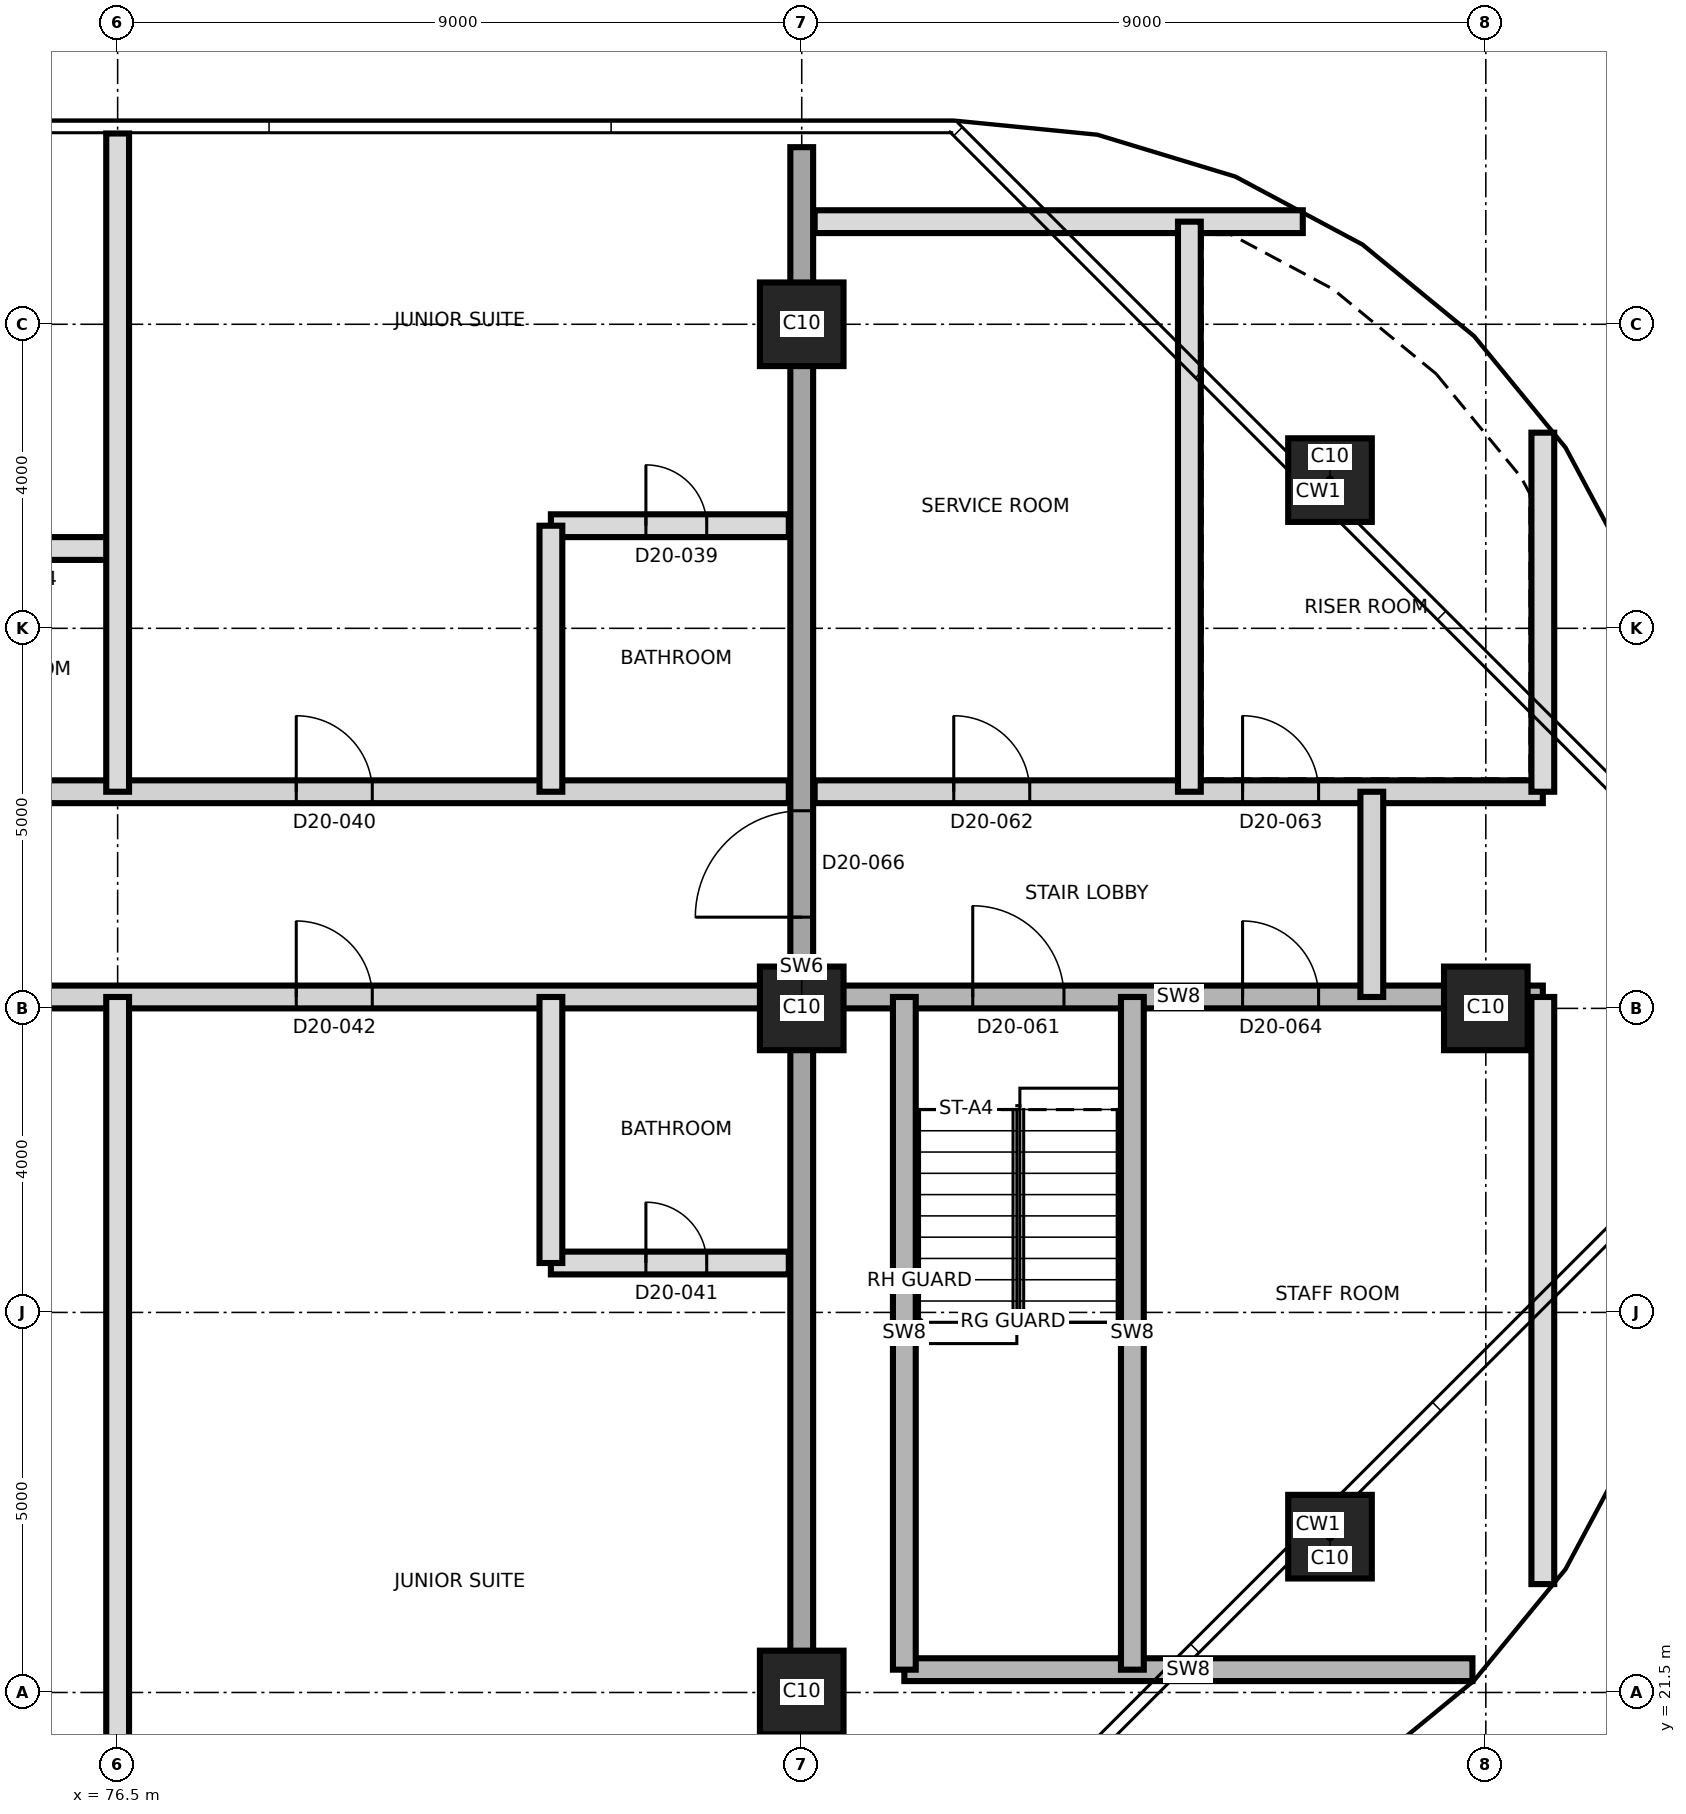
"""IFC4 building model, lengths in metres.
Left out: names, types, materials, properties, quantities, classifications, styles, units other than length and angle.
Written with IfcOpenShell. Run it as: python <this file> out.ifc"""

import sys

from ifc_helpers import new_model, si_unit, direction, frame, frame_2d, origin, origin_2d, place, context, subcontext, project, spatial, rectangle, extrude, element, fill, save


model = new_model("IFC4")
c1 = context("Model", 3, precision=1e-05, world=origin(), true_north=direction((0.0, 1.0)))
c2 = subcontext(c1, "Body", "Model", "MODEL_VIEW")
j1 = project(units=[si_unit("LENGTHUNIT", "METRE"), si_unit("PLANEANGLEUNIT", "RADIAN")], contexts=[c1])
p1 = place(None, origin())
s1 = spatial("IfcSite", under=j1, at=p1, CompositionType="ELEMENT")
p2 = place(p1, origin())
s2 = spatial("IfcBuilding", under=s1, at=p2, CompositionType="ELEMENT")
p3 = place(p2, frame((0.0, 0.0, 186.6)))
s3 = spatial("IfcBuildingStorey", under=s2, at=p3, CompositionType="ELEMENT", Elevation=186.6)
for number, where, z_axis, x_axis in (
    (1, (85.5, 21.5, 0.0), (0.0, 0.0, 1.0), (1.0, 0.0, 0.0)),
    (2, (92.45, 23.55, 0.0), (0.0, 0.0, 1.0), (1.0, 0.0, 0.0)),
    (3, (85.5, 30.5, 0.0), (0.0, 0.0, 1.0), (1.0, 0.0, 0.0)),
    (4, (94.5, 30.5, 0.0), (0.0, 0.0, 1.0), (1.0, 0.0, 0.0)),
    (5, (92.45, 37.45, 0.0), (0.0, 0.0, 1.0), (1.0, 0.0, 0.0)),
    (6, (85.5, 39.5, 0.0), (0.0, 0.0, 1.0), (1.0, 0.0, 0.0)),
):
    element("IfcColumn", number, at=place(p3, frame(where, z_axis=z_axis, x_axis=x_axis)), inside=s3, PredefinedType="COLUMN", context=c2, shape_type="SweptSolid", body=[
        extrude(rectangle(XDim=1.1, YDim=1.1, at=origin_2d()), origin(), (0.0, 0.0, 1.0), 3.7),
    ])
p4 = place(p3, frame((85.5, 19.17, 0.0), z_axis=(0.0, 0.0, 1.0), x_axis=(0.0, 1.0, 0.0)))
e7 = element("IfcWall", 7, at=p4, inside=s3, PredefinedType="SHEAR", context=c2, shape_type="SweptSolid", body=[
    extrude(rectangle(XDim=22.66, YDim=0.3, at=frame_2d((11.33, 0.0))), origin(), (0.0, 0.0, 1.0), 3.7),
])
p5 = place(p4, frame((12.53, 0.0, 0.0)))
e8 = element("IfcOpeningElement", 8, at=p5, cuts=e7, PredefinedType="OPENING", context=c2, shape_type="SweptSolid", body=[
    extrude(rectangle(XDim=1.4, YDim=2.1, at=frame_2d((0.7, 1.05))), frame((0.0, 0.16, 0.0), z_axis=(0.0, -1.0, 0.0), x_axis=(1.0, 0.0, 0.0)), (0.0, 0.0, 1.0), 0.32),
])
p6 = place(p3, frame((86.85, 21.8, 0.0), z_axis=(0.0, 0.0, 1.0), x_axis=(1.0, 0.0, 0.0)))
e9 = element("IfcWall", 9, at=p6, inside=s3, PredefinedType="SHEAR", context=c2, shape_type="SweptSolid", body=[
    extrude(rectangle(XDim=7.474, YDim=0.3, at=frame_2d((3.737, 0.0))), origin(), (0.0, 0.0, 1.0), 3.4),
])
p7 = place(p3, frame((82.2, 27.15, 0.0), z_axis=(0.0, 0.0, 1.0), x_axis=(1.0, 0.0, 0.0)))
e10 = element("IfcWall", 10, at=p7, inside=s3, PredefinedType="PARTITIONING", context=c2, shape_type="SweptSolid", body=[
    extrude(rectangle(XDim=3.13, YDim=0.3, at=frame_2d((1.565, 0.0))), origin(), (0.0, 0.0, 1.0), 3.4),
])
p8 = place(p7, frame((1.25, 0.0, 0.0)))
e11 = element("IfcOpeningElement", 11, at=p8, cuts=e10, PredefinedType="OPENING", context=c2, shape_type="SweptSolid", body=[
    extrude(rectangle(XDim=0.8, YDim=2.1, at=frame_2d((0.4, 1.05))), frame((0.0, 0.16, 0.0), z_axis=(0.0, -1.0, 0.0), x_axis=(1.0, 0.0, 0.0)), (0.0, 0.0, 1.0), 0.32),
])
p9 = place(p3, frame((58.65, 30.65, 0.0), z_axis=(0.0, 0.0, 1.0), x_axis=(1.0, 0.0, 0.0)))
e12 = element("IfcWall", 12, at=p9, inside=s3, PredefinedType="PARTITIONING", context=c2, shape_type="SweptSolid", body=[
    extrude(rectangle(XDim=26.68, YDim=0.3, at=frame_2d((13.34, 0.0))), origin(), (0.0, 0.0, 1.0), 3.4),
])
p10 = place(p9, frame((2.9, 0.0, 0.0)))
e13 = element("IfcOpeningElement", 13, at=p10, cuts=e12, PredefinedType="OPENING", context=c2, shape_type="SweptSolid", body=[
    extrude(rectangle(XDim=1.0, YDim=2.1, at=frame_2d((0.5, 1.05))), frame((0.0, 0.16, 0.0), z_axis=(0.0, -1.0, 0.0), x_axis=(1.0, 0.0, 0.0)), (0.0, 0.0, 1.0), 0.32),
])
p11 = place(p9, frame((5.85, 0.0, 0.0)))
e14 = element("IfcOpeningElement", 14, at=p11, cuts=e12, PredefinedType="OPENING", context=c2, shape_type="SweptSolid", body=[
    extrude(rectangle(XDim=1.4, YDim=2.1, at=frame_2d((0.7, 1.05))), frame((0.0, 0.16, 0.0), z_axis=(0.0, -1.0, 0.0), x_axis=(1.0, 0.0, 0.0)), (0.0, 0.0, 1.0), 0.32),
])
p12 = place(p9, frame((10.0, 0.0, 0.0)))
e15 = element("IfcOpeningElement", 15, at=p12, cuts=e12, PredefinedType="OPENING", context=c2, shape_type="SweptSolid", body=[
    extrude(rectangle(XDim=1.0, YDim=2.1, at=frame_2d((0.5, 1.05))), frame((0.0, 0.16, 0.0), z_axis=(0.0, -1.0, 0.0), x_axis=(1.0, 0.0, 0.0)), (0.0, 0.0, 1.0), 0.32),
])
p13 = place(p9, frame((15.85, 0.0, 0.0)))
e16 = element("IfcOpeningElement", 16, at=p13, cuts=e12, PredefinedType="OPENING", context=c2, shape_type="SweptSolid", body=[
    extrude(rectangle(XDim=1.0, YDim=2.1, at=frame_2d((0.5, 1.05))), frame((0.0, 0.16, 0.0), z_axis=(0.0, -1.0, 0.0), x_axis=(1.0, 0.0, 0.0)), (0.0, 0.0, 1.0), 0.32),
])
p14 = place(p9, frame((20.2, 0.0, 0.0)))
e17 = element("IfcOpeningElement", 17, at=p14, cuts=e12, PredefinedType="OPENING", context=c2, shape_type="SweptSolid", body=[
    extrude(rectangle(XDim=1.0, YDim=2.1, at=frame_2d((0.5, 1.05))), frame((0.0, 0.16, 0.0), z_axis=(0.0, -1.0, 0.0), x_axis=(1.0, 0.0, 0.0)), (0.0, 0.0, 1.0), 0.32),
])
p15 = place(p3, frame((85.67, 30.65, 0.0), z_axis=(0.0, 0.0, 1.0), x_axis=(1.0, 0.0, 0.0)))
e18 = element("IfcWall", 18, at=p15, inside=s3, PredefinedType="SHEAR", context=c2, shape_type="SweptSolid", body=[
    extrude(rectangle(XDim=9.58, YDim=0.3, at=frame_2d((4.79, 0.0))), origin(), (0.0, 0.0, 1.0), 3.4),
])
p16 = place(p15, frame((2.08, 0.0, 0.0)))
e19 = element("IfcOpeningElement", 19, at=p16, cuts=e18, PredefinedType="OPENING", context=c2, shape_type="SweptSolid", body=[
    extrude(rectangle(XDim=1.2, YDim=2.1, at=frame_2d((0.6, 1.05))), frame((0.0, 0.16, 0.0), z_axis=(0.0, -1.0, 0.0), x_axis=(1.0, 0.0, 0.0)), (0.0, 0.0, 1.0), 0.32),
])
p17 = place(p15, frame((5.63, 0.0, 0.0)))
e20 = element("IfcOpeningElement", 20, at=p17, cuts=e18, PredefinedType="OPENING", context=c2, shape_type="SweptSolid", body=[
    extrude(rectangle(XDim=1.0, YDim=2.1, at=frame_2d((0.5, 1.05))), frame((0.0, 0.16, 0.0), z_axis=(0.0, -1.0, 0.0), x_axis=(1.0, 0.0, 0.0)), (0.0, 0.0, 1.0), 0.32),
])
p18 = place(p3, frame((58.65, 33.35, 0.0), z_axis=(0.0, 0.0, 1.0), x_axis=(1.0, 0.0, 0.0)))
e21 = element("IfcWall", 21, at=p18, inside=s3, PredefinedType="PARTITIONING", context=c2, shape_type="SweptSolid", body=[
    extrude(rectangle(XDim=26.68, YDim=0.3, at=frame_2d((13.34, 0.0))), origin(), (0.0, 0.0, 1.0), 3.4),
])
p19 = place(p18, frame((3.265, 0.0, 0.0)))
e22 = element("IfcOpeningElement", 22, at=p19, cuts=e21, PredefinedType="OPENING", context=c2, shape_type="SweptSolid", body=[
    extrude(rectangle(XDim=1.0, YDim=2.1, at=frame_2d((0.5, 1.05))), frame((0.0, 0.16, 0.0), z_axis=(0.0, -1.0, 0.0), x_axis=(1.0, 0.0, 0.0)), (0.0, 0.0, 1.0), 0.32),
])
p20 = place(p18, frame((6.215, 0.0, 0.0)))
e23 = element("IfcOpeningElement", 23, at=p20, cuts=e21, PredefinedType="OPENING", context=c2, shape_type="SweptSolid", body=[
    extrude(rectangle(XDim=1.4, YDim=2.1, at=frame_2d((0.7, 1.05))), frame((0.0, 0.16, 0.0), z_axis=(0.0, -1.0, 0.0), x_axis=(1.0, 0.0, 0.0)), (0.0, 0.0, 1.0), 0.32),
])
p21 = place(p18, frame((9.985, 0.0, 0.0)))
e24 = element("IfcOpeningElement", 24, at=p21, cuts=e21, PredefinedType="OPENING", context=c2, shape_type="SweptSolid", body=[
    extrude(rectangle(XDim=1.2, YDim=2.1, at=frame_2d((0.6, 1.05))), frame((0.0, 0.16, 0.0), z_axis=(0.0, -1.0, 0.0), x_axis=(1.0, 0.0, 0.0)), (0.0, 0.0, 1.0), 0.32),
])
p22 = place(p18, frame((13.235, 0.0, 0.0)))
e25 = element("IfcOpeningElement", 25, at=p22, cuts=e21, PredefinedType="OPENING", context=c2, shape_type="SweptSolid", body=[
    extrude(rectangle(XDim=1.0, YDim=2.1, at=frame_2d((0.5, 1.05))), frame((0.0, 0.16, 0.0), z_axis=(0.0, -1.0, 0.0), x_axis=(1.0, 0.0, 0.0)), (0.0, 0.0, 1.0), 0.32),
])
p23 = place(p18, frame((20.2, 0.0, 0.0)))
e26 = element("IfcOpeningElement", 26, at=p23, cuts=e21, PredefinedType="OPENING", context=c2, shape_type="SweptSolid", body=[
    extrude(rectangle(XDim=1.0, YDim=2.1, at=frame_2d((0.5, 1.05))), frame((0.0, 0.16, 0.0), z_axis=(0.0, -1.0, 0.0), x_axis=(1.0, 0.0, 0.0)), (0.0, 0.0, 1.0), 0.32),
])
p24 = place(p3, frame((85.67, 33.35, 0.0), z_axis=(0.0, 0.0, 1.0), x_axis=(1.0, 0.0, 0.0)))
e27 = element("IfcWall", 27, at=p24, inside=s3, PredefinedType="PARTITIONING", context=c2, shape_type="SweptSolid", body=[
    extrude(rectangle(XDim=9.58, YDim=0.3, at=frame_2d((4.79, 0.0))), origin(), (0.0, 0.0, 1.0), 3.4),
])
p25 = place(p24, frame((1.83, 0.0, 0.0)))
e28 = element("IfcOpeningElement", 28, at=p25, cuts=e27, PredefinedType="OPENING", context=c2, shape_type="SweptSolid", body=[
    extrude(rectangle(XDim=1.0, YDim=2.1, at=frame_2d((0.5, 1.05))), frame((0.0, 0.16, 0.0), z_axis=(0.0, -1.0, 0.0), x_axis=(1.0, 0.0, 0.0)), (0.0, 0.0, 1.0), 0.32),
])
p26 = place(p24, frame((5.63, 0.0, 0.0)))
e29 = element("IfcOpeningElement", 29, at=p26, cuts=e27, PredefinedType="OPENING", context=c2, shape_type="SweptSolid", body=[
    extrude(rectangle(XDim=1.0, YDim=2.1, at=frame_2d((0.5, 1.05))), frame((0.0, 0.16, 0.0), z_axis=(0.0, -1.0, 0.0), x_axis=(1.0, 0.0, 0.0)), (0.0, 0.0, 1.0), 0.32),
])
p27 = place(p3, frame((73.8, 36.55, 0.0), z_axis=(0.0, 0.0, 1.0), x_axis=(1.0, 0.0, 0.0)))
e30 = element("IfcWall", 30, at=p27, inside=s3, PredefinedType="PARTITIONING", context=c2, shape_type="SweptSolid", body=[
    extrude(rectangle(XDim=2.7, YDim=0.3, at=frame_2d((1.35, 0.0))), origin(), (0.0, 0.0, 1.0), 3.4),
])
p28 = place(p27, frame((0.95, 0.0, 0.0)))
e31 = element("IfcOpeningElement", 31, at=p28, cuts=e30, PredefinedType="OPENING", context=c2, shape_type="SweptSolid", body=[
    extrude(rectangle(XDim=0.8, YDim=2.1, at=frame_2d((0.4, 1.05))), frame((0.0, 0.16, 0.0), z_axis=(0.0, -1.0, 0.0), x_axis=(1.0, 0.0, 0.0)), (0.0, 0.0, 1.0), 0.32),
])
p29 = place(p3, frame((82.2, 36.85, 0.0), z_axis=(0.0, 0.0, 1.0), x_axis=(1.0, 0.0, 0.0)))
e32 = element("IfcWall", 32, at=p29, inside=s3, PredefinedType="PARTITIONING", context=c2, shape_type="SweptSolid", body=[
    extrude(rectangle(XDim=3.13, YDim=0.3, at=frame_2d((1.565, 0.0))), origin(), (0.0, 0.0, 1.0), 3.4),
])
p30 = place(p29, frame((1.25, 0.0, 0.0)))
e33 = element("IfcOpeningElement", 33, at=p30, cuts=e32, PredefinedType="OPENING", context=c2, shape_type="SweptSolid", body=[
    extrude(rectangle(XDim=0.8, YDim=2.1, at=frame_2d((0.4, 1.05))), frame((0.0, 0.16, 0.0), z_axis=(0.0, -1.0, 0.0), x_axis=(1.0, 0.0, 0.0)), (0.0, 0.0, 1.0), 0.32),
])
p31 = place(p3, frame((85.67, 40.85, 0.0), z_axis=(0.0, 0.0, 1.0), x_axis=(1.0, 0.0, 0.0)))
e34 = element("IfcWall", 34, at=p31, inside=s3, PredefinedType="PARTITIONING", context=c2, shape_type="SweptSolid", body=[
    extrude(rectangle(XDim=6.422, YDim=0.3, at=frame_2d((3.211, 0.0))), origin(), (0.0, 0.0, 1.0), 3.35),
])
p32 = place(p3, frame((76.5, 19.17, 0.0), z_axis=(0.0, 0.0, 1.0), x_axis=(0.0, 1.0, 0.0)))
e35 = element("IfcWall", 35, at=p32, inside=s3, PredefinedType="PARTITIONING", context=c2, shape_type="SweptSolid", body=[
    extrude(rectangle(XDim=11.48, YDim=0.3, at=frame_2d((5.74, 0.0))), origin(), (0.0, 0.0, 1.0), 3.35),
])
p33 = place(p3, frame((76.5, 33.35, 0.0), z_axis=(0.0, 0.0, 1.0), x_axis=(0.0, 1.0, 0.0)))
e36 = element("IfcWall", 36, at=p33, inside=s3, PredefinedType="PARTITIONING", context=c2, shape_type="SweptSolid", body=[
    extrude(rectangle(XDim=8.66, YDim=0.3, at=frame_2d((4.33, 0.0))), origin(), (0.0, 0.0, 1.0), 3.35),
])
for number, where, z_axis, x_axis in (
    (37, (82.2, 27.15, 0.0), (0.0, 0.0, 1.0), (0.0, 1.0, 0.0)),
    (38, (82.2, 33.35, 0.0), (0.0, 0.0, 1.0), (0.0, 1.0, 0.0)),
):
    element("IfcWall", number, at=place(p3, frame(where, z_axis=z_axis, x_axis=x_axis)), inside=s3, PredefinedType="PARTITIONING", context=c2, shape_type="SweptSolid", body=[
        extrude(rectangle(XDim=3.5, YDim=0.3, at=frame_2d((1.75, 0.0))), origin(), (0.0, 0.0, 1.0), 3.4),
    ])
for number, where, z_axis, x_axis in (
    (39, (86.85, 21.8, 0.0), (0.0, 0.0, 1.0), (0.0, 1.0, 0.0)),
    (40, (89.85, 21.8, 0.0), (0.0, 0.0, 1.0), (0.0, 1.0, 0.0)),
):
    element("IfcWall", number, at=place(p3, frame(where, z_axis=z_axis, x_axis=x_axis)), inside=s3, PredefinedType="SHEAR", context=c2, shape_type="SweptSolid", body=[
        extrude(rectangle(XDim=8.85, YDim=0.3, at=frame_2d((4.425, 0.0))), origin(), (0.0, 0.0, 1.0), 3.4),
    ])
p34 = place(p3, frame((90.6, 33.35, 0.0), z_axis=(0.0, 0.0, 1.0), x_axis=(0.0, 1.0, 0.0)))
e41 = element("IfcWall", 41, at=p34, inside=s3, PredefinedType="PARTITIONING", context=c2, shape_type="SweptSolid", body=[
    extrude(rectangle(XDim=7.5, YDim=0.3, at=frame_2d((3.75, 0.0))), origin(), (0.0, 0.0, 1.0), 3.35),
])
p35 = place(p3, frame((93.0, 30.65, 0.0), z_axis=(0.0, 0.0, 1.0), x_axis=(0.0, 1.0, 0.0)))
e42 = element("IfcWall", 42, at=p35, inside=s3, PredefinedType="PARTITIONING", context=c2, shape_type="SweptSolid", body=[
    extrude(rectangle(XDim=2.7, YDim=0.3, at=frame_2d((1.35, 0.0))), origin(), (0.0, 0.0, 1.0), 3.4),
])
p36 = place(p3, frame((95.25, 22.926, 0.0), z_axis=(0.0, 0.0, 1.0), x_axis=(0.0, 1.0, 0.0)))
e43 = element("IfcWall", 43, at=p36, inside=s3, PredefinedType="PARTITIONING", context=c2, shape_type="SweptSolid", body=[
    extrude(rectangle(XDim=7.724, YDim=0.3, at=frame_2d((3.862, 0.0))), origin(), (0.0, 0.0, 1.0), 3.35),
])
p37 = place(p3, frame((95.25, 33.35, 0.0), z_axis=(0.0, 0.0, 1.0), x_axis=(0.0, 1.0, 0.0)))
e44 = element("IfcWall", 44, at=p37, inside=s3, PredefinedType="PARTITIONING", context=c2, shape_type="SweptSolid", body=[
    extrude(rectangle(XDim=4.724, YDim=0.3, at=frame_2d((2.362, 0.0))), origin(), (0.0, 0.0, 1.0), 3.35),
])
p38 = place(p30, origin())
e45 = element("IfcDoor", 45, at=p38, inside=s3, OperationType="SINGLE_SWING_LEFT", PredefinedType="DOOR", context=c2, shape_type="SweptSolid", body=[
    extrude(rectangle(XDim=0.8, YDim=2.1, at=frame_2d((0.4, 1.05))), frame((0.0, 0.025, 0.0), z_axis=(0.0, -1.0, 0.0), x_axis=(1.0, 0.0, 0.0)), (0.0, 0.0, 1.0), 0.05),
])
fill(e33, e45)
p39 = place(p23, origin())
e46 = element("IfcDoor", 46, at=p39, inside=s3, OperationType="SINGLE_SWING_LEFT", PredefinedType="DOOR", context=c2, shape_type="SweptSolid", body=[
    extrude(rectangle(XDim=1.0, YDim=2.1, at=frame_2d((0.5, 1.05))), frame((0.0, 0.025, 0.0), z_axis=(0.0, -1.0, 0.0), x_axis=(1.0, 0.0, 0.0)), (0.0, 0.0, 1.0), 0.05),
])
fill(e26, e46)
p40 = place(p8, origin())
e47 = element("IfcDoor", 47, at=p40, inside=s3, OperationType="SINGLE_SWING_LEFT", PredefinedType="DOOR", context=c2, shape_type="SweptSolid", body=[
    extrude(rectangle(XDim=0.8, YDim=2.1, at=frame_2d((0.4, 1.05))), frame((0.0, 0.025, 0.0), z_axis=(0.0, -1.0, 0.0), x_axis=(1.0, 0.0, 0.0)), (0.0, 0.0, 1.0), 0.05),
])
fill(e11, e47)
p41 = place(p14, origin())
e48 = element("IfcDoor", 48, at=p41, inside=s3, OperationType="SINGLE_SWING_RIGHT", PredefinedType="DOOR", context=c2, shape_type="SweptSolid", body=[
    extrude(rectangle(XDim=1.0, YDim=2.1, at=frame_2d((0.5, 1.05))), frame((0.0, 0.025, 0.0), z_axis=(0.0, -1.0, 0.0), x_axis=(1.0, 0.0, 0.0)), (0.0, 0.0, 1.0), 0.05),
])
fill(e17, e48)
p42 = place(p16, origin())
e49 = element("IfcDoor", 49, at=p42, inside=s3, OperationType="SINGLE_SWING_LEFT", PredefinedType="DOOR", context=c2, shape_type="SweptSolid", body=[
    extrude(rectangle(XDim=1.2, YDim=2.1, at=frame_2d((0.6, 1.05))), frame((0.0, 0.025, 0.0), z_axis=(0.0, -1.0, 0.0), x_axis=(1.0, 0.0, 0.0)), (0.0, 0.0, 1.0), 0.05),
])
fill(e19, e49)
p43 = place(p25, origin())
e50 = element("IfcDoor", 50, at=p43, inside=s3, OperationType="SINGLE_SWING_LEFT", PredefinedType="DOOR", context=c2, shape_type="SweptSolid", body=[
    extrude(rectangle(XDim=1.0, YDim=2.1, at=frame_2d((0.5, 1.05))), frame((0.0, 0.025, 0.0), z_axis=(0.0, -1.0, 0.0), x_axis=(1.0, 0.0, 0.0)), (0.0, 0.0, 1.0), 0.05),
])
fill(e28, e50)
p44 = place(p26, origin())
e51 = element("IfcDoor", 51, at=p44, inside=s3, OperationType="SINGLE_SWING_RIGHT", PredefinedType="DOOR", context=c2, shape_type="SweptSolid", body=[
    extrude(rectangle(XDim=1.0, YDim=2.1, at=frame_2d((0.5, 1.05))), frame((0.0, 0.025, 0.0), z_axis=(0.0, -1.0, 0.0), x_axis=(1.0, 0.0, 0.0)), (0.0, 0.0, 1.0), 0.05),
])
fill(e29, e51)
p45 = place(p17, origin())
e52 = element("IfcDoor", 52, at=p45, inside=s3, OperationType="SINGLE_SWING_LEFT", PredefinedType="DOOR", context=c2, shape_type="SweptSolid", body=[
    extrude(rectangle(XDim=1.0, YDim=2.1, at=frame_2d((0.5, 1.05))), frame((0.0, 0.025, 0.0), z_axis=(0.0, -1.0, 0.0), x_axis=(1.0, 0.0, 0.0)), (0.0, 0.0, 1.0), 0.05),
])
fill(e20, e52)
p46 = place(p5, origin())
e53 = element("IfcDoor", 53, at=p46, inside=s3, OperationType="SINGLE_SWING_RIGHT", PredefinedType="DOOR", context=c2, shape_type="SweptSolid", body=[
    extrude(rectangle(XDim=1.4, YDim=2.1, at=frame_2d((0.7, 1.05))), frame((0.0, 0.025, 0.0), z_axis=(0.0, -1.0, 0.0), x_axis=(1.0, 0.0, 0.0)), (0.0, 0.0, 1.0), 0.05),
])
fill(e8, e53)
save(model, sys.argv[1])
